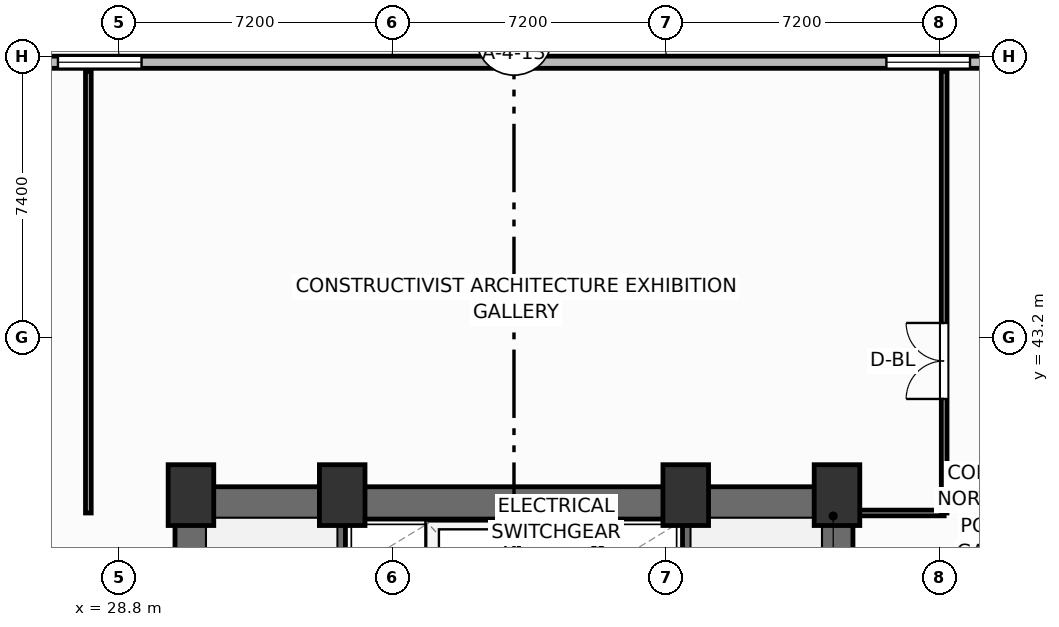
"""IFC4 building model, lengths in metres.
Left out: names, types, materials, properties, quantities, classifications, styles, units other than length and angle.
Written with IfcOpenShell. Run it as: python <this file> out.ifc"""

import sys

from ifc_helpers import new_model, si_unit, direction, frame, frame_2d, origin, origin_2d, place, context, subcontext, project, spatial, rectangle, extrude, element, fill, save


model = new_model("IFC4")
c1 = context("Model", 3, precision=1e-05, world=origin(), true_north=direction((0.0, 1.0)))
c2 = subcontext(c1, "Body", "Model", "MODEL_VIEW")
j1 = project(units=[si_unit("LENGTHUNIT", "METRE"), si_unit("PLANEANGLEUNIT", "RADIAN")], contexts=[c1])
p1 = place(None, origin())
s1 = spatial("IfcSite", under=j1, at=p1, CompositionType="ELEMENT")
p2 = place(p1, origin())
s2 = spatial("IfcBuilding", under=s1, at=p2, CompositionType="ELEMENT")
p3 = place(p2, frame((0.0, 0.0, 10.8)))
s3 = spatial("IfcBuildingStorey", under=s2, at=p3, CompositionType="ELEMENT", Elevation=10.8)
for number, where, z_axis, x_axis in (
    (1, (30.7, 39.05, 0.0), (0.0, 0.0, 1.0), (1.0, 0.0, 0.0)),
    (2, (34.68, 39.05, 0.0), (0.0, 0.0, 1.0), (1.0, 0.0, 0.0)),
    (3, (43.72, 39.05, 0.0), (0.0, 0.0, 1.0), (1.0, 0.0, 0.0)),
    (4, (47.7, 39.05, 0.0), (0.0, 0.0, 1.0), (1.0, 0.0, 0.0)),
):
    element("IfcColumn", number, at=place(p3, frame(where, z_axis=z_axis, x_axis=x_axis)), inside=s3, PredefinedType="COLUMN", context=c2, shape_type="SweptSolid", body=[
        extrude(rectangle(XDim=1.2, YDim=1.6, at=origin_2d()), origin(), (0.0, 0.0, 1.0), 5.4),
    ])
p4 = place(p3, frame((30.28, 38.845, 0.0), z_axis=(0.0, 0.0, 1.0), x_axis=(1.0, 0.0, 0.0)))
e5 = element("IfcWall", 5, at=p4, inside=s3, PredefinedType="SHEAR", context=c2, shape_type="SweptSolid", body=[
    extrude(rectangle(XDim=17.84, YDim=0.85, at=frame_2d((8.92, 0.0))), origin(), (0.0, 0.0, 1.0), 5.12),
])
for number, where, z_axis, x_axis in (
    (6, (30.705, 29.2, 0.0), (0.0, 0.0, 1.0), (0.0, 1.0, 0.0)),
    (7, (47.695, 29.2, 0.0), (0.0, 0.0, 1.0), (0.0, 1.0, 0.0)),
):
    element("IfcWall", number, at=place(p3, frame(where, z_axis=z_axis, x_axis=x_axis)), inside=s3, PredefinedType="SHEAR", context=c2, shape_type="SweptSolid", body=[
        extrude(rectangle(XDim=9.22, YDim=0.85, at=frame_2d((4.61, 0.0))), origin(), (0.0, 0.0, 1.0), 5.12),
    ])
p5 = place(p3, frame((34.64, 29.2, 0.0), z_axis=(0.0, 0.0, 1.0), x_axis=(0.0, 1.0, 0.0)))
e8 = element("IfcWall", 8, at=p5, inside=s3, PredefinedType="SHEAR", context=c2, shape_type="SweptSolid", body=[
    extrude(rectangle(XDim=9.22, YDim=0.25, at=frame_2d((4.61, 0.0))), origin(), (0.0, 0.0, 1.0), 5.12),
])
p6 = place(p5, frame((0.65, 0.0, 0.0)))
e9 = element("IfcOpeningElement", 9, at=p6, cuts=e8, PredefinedType="OPENING", context=c2, shape_type="SweptSolid", body=[
    extrude(rectangle(XDim=1.05, YDim=2.15, at=frame_2d((0.525, 1.075))), frame((0.0, 0.135, 0.0), z_axis=(0.0, -1.0, 0.0), x_axis=(1.0, 0.0, 0.0)), (0.0, 0.0, 1.0), 0.27),
])
p7 = place(p3, frame((43.76, 29.2, 0.0), z_axis=(0.0, 0.0, 1.0), x_axis=(0.0, 1.0, 0.0)))
e10 = element("IfcWall", 10, at=p7, inside=s3, PredefinedType="SHEAR", context=c2, shape_type="SweptSolid", body=[
    extrude(rectangle(XDim=9.22, YDim=0.25, at=frame_2d((4.61, 0.0))), origin(), (0.0, 0.0, 1.0), 5.12),
])
p8 = place(p7, frame((0.65, 0.0, 0.0)))
e11 = element("IfcOpeningElement", 11, at=p8, cuts=e10, PredefinedType="OPENING", context=c2, shape_type="SweptSolid", body=[
    extrude(rectangle(XDim=1.05, YDim=2.15, at=frame_2d((0.525, 1.075))), frame((0.0, 0.135, 0.0), z_axis=(0.0, -1.0, 0.0), x_axis=(1.0, 0.0, 0.0)), (0.0, 0.0, 1.0), 0.27),
])
p9 = place(p3, frame((25.4, 50.44, 0.0), z_axis=(0.0, 0.0, 1.0), x_axis=(1.0, 0.0, 0.0)))
e12 = element("IfcWall", 12, at=p9, inside=s3, PredefinedType="SOLIDWALL", context=c2, shape_type="SweptSolid", body=[
    extrude(rectangle(XDim=27.6, YDim=0.32, at=frame_2d((13.8, 0.0))), origin(), (0.0, 0.0, 1.0), 4.07),
])
p10 = place(p9, frame((1.8, 0.0, 0.8)))
e13 = element("IfcOpeningElement", 13, at=p10, cuts=e12, PredefinedType="OPENING", context=c2, shape_type="SweptSolid", body=[
    extrude(rectangle(XDim=2.2, YDim=1.85, at=frame_2d((1.1, 0.925))), frame((0.0, 0.17, 0.0), z_axis=(0.0, -1.0, 0.0), x_axis=(1.0, 0.0, 0.0)), (0.0, 0.0, 1.0), 0.34),
])
p11 = place(p9, frame((23.6, 0.0, 0.8)))
e14 = element("IfcOpeningElement", 14, at=p11, cuts=e12, PredefinedType="OPENING", context=c2, shape_type="SweptSolid", body=[
    extrude(rectangle(XDim=2.2, YDim=1.85, at=frame_2d((1.1, 0.925))), frame((0.0, 0.17, 0.0), z_axis=(0.0, -1.0, 0.0), x_axis=(1.0, 0.0, 0.0)), (0.0, 0.0, 1.0), 0.34),
])
p12 = place(p3, frame((48.12, 38.58, 0.0), z_axis=(0.0, 0.0, 1.0), x_axis=(1.0, 0.0, 0.0)))
e15 = element("IfcWall", 15, at=p12, inside=s3, PredefinedType="PARTITIONING", context=c2, shape_type="SweptSolid", body=[
    extrude(rectangle(XDim=2.4, YDim=0.15, at=frame_2d((1.2, 0.0))), origin(), (0.0, 0.0, 1.0), 4.085),
])
p13 = place(p3, frame((50.52, 38.58, 0.0), z_axis=(0.0, 0.0, 1.0), x_axis=(0.0, 1.0, 0.0)))
e16 = element("IfcWall", 16, at=p13, inside=s3, PredefinedType="PARTITIONING", context=c2, shape_type="SweptSolid", body=[
    extrude(rectangle(XDim=11.62, YDim=0.15, at=frame_2d((5.81, 0.0))), origin(), (0.0, 0.0, 1.0), 5.12),
])
p14 = place(p13, frame((3.0, 0.0, 0.0)))
e17 = element("IfcOpeningElement", 17, at=p14, cuts=e16, PredefinedType="OPENING", context=c2, shape_type="SweptSolid", body=[
    extrude(rectangle(XDim=2.0, YDim=2.05, at=frame_2d((1.0, 1.025))), frame((0.0, 0.085, 0.0), z_axis=(0.0, -1.0, 0.0), x_axis=(1.0, 0.0, 0.0)), (0.0, 0.0, 1.0), 0.17),
])
p15 = place(p3, frame((28.0, 38.58, 0.0), z_axis=(0.0, 0.0, 1.0), x_axis=(0.0, 1.0, 0.0)))
e18 = element("IfcWall", 18, at=p15, inside=s3, PredefinedType="PARTITIONING", context=c2, shape_type="SweptSolid", body=[
    extrude(rectangle(XDim=11.62, YDim=0.15, at=frame_2d((5.81, 0.0))), origin(), (0.0, 0.0, 1.0), 5.12),
])
for number, where, z_axis, x_axis in (
    (19, (37.0, 34.44, 0.0), (0.0, 0.0, 1.0), (0.0, 1.0, 0.0)),
    (20, (41.4, 34.44, 0.0), (0.0, 0.0, 1.0), (0.0, 1.0, 0.0)),
):
    element("IfcWall", number, at=place(p3, frame(where, z_axis=z_axis, x_axis=x_axis)), inside=s3, PredefinedType="PARTITIONING", context=c2, shape_type="SweptSolid", body=[
        extrude(rectangle(XDim=3.9, YDim=0.2, at=frame_2d((1.95, 0.0))), origin(), (0.0, 0.0, 1.0), 5.12),
    ])
p16 = place(p3, frame((39.22, 35.75, 0.0), z_axis=(0.0, 0.0, 1.0), x_axis=(0.0, 1.0, 0.0)))
e21 = element("IfcWall", 21, at=p16, inside=s3, PredefinedType="PARTITIONING", context=c2, shape_type="SweptSolid", body=[
    extrude(rectangle(XDim=2.59, YDim=0.2, at=frame_2d((1.295, 0.0))), origin(), (0.0, 0.0, 1.0), 5.12),
])
p17 = place(p10, origin())
e22 = element("IfcWindow", 22, at=p17, inside=s3, PartitioningType="SINGLE_PANEL", PredefinedType="WINDOW", context=c2, shape_type="SweptSolid", body=[
    extrude(rectangle(XDim=2.2, YDim=1.85, at=frame_2d((1.1, 0.925))), frame((0.0, 0.03, 0.0), z_axis=(0.0, -1.0, 0.0), x_axis=(1.0, 0.0, 0.0)), (0.0, 0.0, 1.0), 0.06),
])
fill(e13, e22)
p18 = place(p11, origin())
e23 = element("IfcWindow", 23, at=p18, inside=s3, PartitioningType="SINGLE_PANEL", PredefinedType="WINDOW", context=c2, shape_type="SweptSolid", body=[
    extrude(rectangle(XDim=2.2, YDim=1.85, at=frame_2d((1.1, 0.925))), frame((0.0, 0.03, 0.0), z_axis=(0.0, -1.0, 0.0), x_axis=(1.0, 0.0, 0.0)), (0.0, 0.0, 1.0), 0.06),
])
fill(e14, e23)
p19 = place(p14, origin())
e24 = element("IfcDoor", 24, at=p19, inside=s3, OperationType="DOUBLE_DOOR_SINGLE_SWING", PredefinedType="DOOR", context=c2, shape_type="SweptSolid", body=[
    extrude(rectangle(XDim=2.0, YDim=2.05, at=frame_2d((1.0, 1.025))), frame((0.0, 0.025, 0.0), z_axis=(0.0, -1.0, 0.0), x_axis=(1.0, 0.0, 0.0)), (0.0, 0.0, 1.0), 0.05),
])
fill(e17, e24)
save(model, sys.argv[1])
